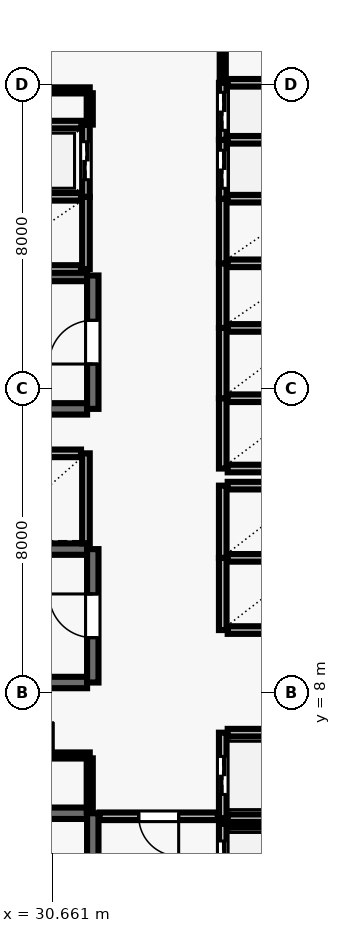
"""IFC4 building model, lengths in metres.
Left out: names, types, materials, properties, quantities, classifications, styles, units other than length and angle.
Written with IfcOpenShell. Run it as: python <this file> out.ifc"""

import sys

from ifc_helpers import new_model, si_unit, direction, frame, frame_2d, origin, place, context, subcontext, project, spatial, rectangle, extrude, element, fill, save


model = new_model("IFC4")
c1 = context("Model", 3, precision=1e-05, world=origin(), true_north=direction((0.0, 1.0)))
c2 = subcontext(c1, "Body", "Model", "MODEL_VIEW")
j1 = project(units=[si_unit("LENGTHUNIT", "METRE"), si_unit("PLANEANGLEUNIT", "RADIAN")], contexts=[c1])
p1 = place(None, origin())
s1 = spatial("IfcSite", under=j1, at=p1, CompositionType="ELEMENT")
p2 = place(p1, origin())
s2 = spatial("IfcBuilding", under=s1, at=p2, CompositionType="ELEMENT")
p3 = place(p2, frame((0.0, 0.0, 15.6)))
s3 = spatial("IfcBuildingStorey", under=s2, at=p3, CompositionType="ELEMENT", Elevation=15.6)
p4 = place(p3, frame((31.58, 4.83, 0.0), z_axis=(0.0, 0.0, 1.0), x_axis=(-1.0, 0.0, 0.0)))
e1 = element("IfcWall", 1, at=p4, inside=s3, PredefinedType="SHEAR", context=c2, shape_type="SweptSolid", body=[
    extrude(rectangle(XDim=8.36, YDim=0.3, at=frame_2d((4.18, 0.0))), origin(), (0.0, 0.0, 1.0), 4.92),
])
p5 = place(p3, frame((31.73, 0.96, 0.0), z_axis=(0.0, 0.0, 1.0), x_axis=(0.0, 1.0, 0.0)))
e2 = element("IfcWall", 2, at=p5, inside=s3, PredefinedType="SHEAR", context=c2, shape_type="SweptSolid", body=[
    extrude(rectangle(XDim=3.87, YDim=0.3, at=frame_2d((1.935, 0.0))), origin(), (0.0, 0.0, 1.0), 4.92),
])
p6 = place(p5, frame((1.54, 0.0, 0.0)))
e3 = element("IfcOpeningElement", 3, at=p6, cuts=e2, PredefinedType="OPENING", context=c2, shape_type="SweptSolid", body=[
    extrude(rectangle(XDim=1.15, YDim=2.15, at=frame_2d((0.575, 1.075))), frame((0.0, 0.16, 0.0), z_axis=(0.0, -1.0, 0.0), x_axis=(1.0, 0.0, 0.0)), (0.0, 0.0, 1.0), 0.32),
])
for number, where, z_axis, x_axis in (
    (4, (31.58, 18.98, 0.0), (0.0, 0.0, 1.0), (-1.0, 0.0, 0.0)),
    (5, (23.22, 15.47, 0.0), (0.0, 0.0, 1.0), (1.0, 0.0, 0.0)),
):
    element("IfcWall", number, at=place(p3, frame(where, z_axis=z_axis, x_axis=x_axis)), inside=s3, PredefinedType="SHEAR", context=c2, shape_type="SweptSolid", body=[
        extrude(rectangle(XDim=8.36, YDim=0.3, at=frame_2d((4.18, 0.0))), origin(), (0.0, 0.0, 1.0), 4.92),
    ])
p7 = place(p3, frame((31.73, 15.47, 0.0), z_axis=(0.0, 0.0, 1.0), x_axis=(0.0, 1.0, 0.0)))
e6 = element("IfcWall", 6, at=p7, inside=s3, PredefinedType="SHEAR", context=c2, shape_type="SweptSolid", body=[
    extrude(rectangle(XDim=3.51, YDim=0.3, at=frame_2d((1.755, 0.0))), origin(), (0.0, 0.0, 1.0), 4.92),
])
p8 = place(p7, frame((1.18, 0.0, 0.0)))
e7 = element("IfcOpeningElement", 7, at=p8, cuts=e6, PredefinedType="OPENING", context=c2, shape_type="SweptSolid", body=[
    extrude(rectangle(XDim=1.15, YDim=2.15, at=frame_2d((0.575, 1.075))), frame((0.0, 0.16, 0.0), z_axis=(0.0, -1.0, 0.0), x_axis=(1.0, 0.0, 0.0)), (0.0, 0.0, 1.0), 0.32),
])
for number, where, z_axis, x_axis in (
    (8, (31.58, 11.78, 0.0), (0.0, 0.0, 1.0), (-1.0, 0.0, 0.0)),
    (9, (23.22, 8.27, 0.0), (0.0, 0.0, 1.0), (1.0, 0.0, 0.0)),
):
    element("IfcWall", number, at=place(p3, frame(where, z_axis=z_axis, x_axis=x_axis)), inside=s3, PredefinedType="SHEAR", context=c2, shape_type="SweptSolid", body=[
        extrude(rectangle(XDim=8.36, YDim=0.3, at=frame_2d((4.18, 0.0))), origin(), (0.0, 0.0, 1.0), 4.92),
    ])
p9 = place(p3, frame((31.73, 8.27, 0.0), z_axis=(0.0, 0.0, 1.0), x_axis=(0.0, 1.0, 0.0)))
e10 = element("IfcWall", 10, at=p9, inside=s3, PredefinedType="SHEAR", context=c2, shape_type="SweptSolid", body=[
    extrude(rectangle(XDim=3.51, YDim=0.3, at=frame_2d((1.755, 0.0))), origin(), (0.0, 0.0, 1.0), 4.92),
])
p10 = place(p9, frame((1.18, 0.0, 0.0)))
e11 = element("IfcOpeningElement", 11, at=p10, cuts=e10, PredefinedType="OPENING", context=c2, shape_type="SweptSolid", body=[
    extrude(rectangle(XDim=1.15, YDim=2.15, at=frame_2d((0.575, 1.075))), frame((0.0, 0.16, 0.0), z_axis=(0.0, -1.0, 0.0), x_axis=(1.0, 0.0, 0.0)), (0.0, 0.0, 1.0), 0.32),
])
p11 = place(p3, frame((35.15, 4.55, 0.0), z_axis=(0.0, 0.0, 1.0), x_axis=(0.0, -1.0, 0.0)))
e12 = element("IfcWall", 12, at=p11, inside=s3, PredefinedType="SOLIDWALL", context=c2, shape_type="SweptSolid", body=[
    extrude(rectangle(XDim=2.1, YDim=0.2, at=frame_2d((1.05, 0.0))), origin(), (0.0, 0.0, 1.0), 4.92),
])
p12 = place(p11, frame((0.45, 0.0, 0.0)))
e13 = element("IfcOpeningElement", 13, at=p12, cuts=e12, PredefinedType="OPENING", context=c2, shape_type="SweptSolid", body=[
    extrude(rectangle(XDim=1.2, YDim=2.15, at=frame_2d((0.6, 1.075))), frame((0.0, 0.11, 0.0), z_axis=(0.0, -1.0, 0.0), x_axis=(1.0, 0.0, 0.0)), (0.0, 0.0, 1.0), 0.22),
])
p13 = place(p3, frame((37.42, 4.55, 0.0), z_axis=(0.0, 0.0, 1.0), x_axis=(-1.0, 0.0, 0.0)))
e14 = element("IfcWall", 14, at=p13, inside=s3, PredefinedType="SOLIDWALL", context=c2, shape_type="SweptSolid", body=[
    extrude(rectangle(XDim=2.14, YDim=0.2, at=frame_2d((1.07, 0.0))), origin(), (0.0, 0.0, 1.0), 4.92),
])
p14 = place(p3, frame((35.15, 6.95, 0.0), z_axis=(0.0, 0.0, 1.0), x_axis=(0.0, -1.0, 0.0)))
e15 = element("IfcWall", 15, at=p14, inside=s3, PredefinedType="SOLIDWALL", context=c2, shape_type="SweptSolid", body=[
    extrude(rectangle(XDim=2.25, YDim=0.2, at=frame_2d((1.125, 0.0))), origin(), (0.0, 0.0, 1.0), 4.92),
])
p15 = place(p14, frame((0.625, 0.0, 0.0)))
e16 = element("IfcOpeningElement", 16, at=p15, cuts=e15, PredefinedType="OPENING", context=c2, shape_type="SweptSolid", body=[
    extrude(rectangle(XDim=1.0, YDim=2.1, at=frame_2d((0.5, 1.05))), frame((0.0, 0.11, 0.0), z_axis=(0.0, -1.0, 0.0), x_axis=(1.0, 0.0, 0.0)), (0.0, 0.0, 1.0), 0.22),
])
for number, where, z_axis, x_axis in (
    (17, (35.28, 4.7, 0.0), (0.0, 0.0, 1.0), (1.0, 0.0, 0.0)),
    (18, (37.42, 6.95, 0.0), (0.0, 0.0, 1.0), (-1.0, 0.0, 0.0)),
):
    element("IfcWall", number, at=place(p3, frame(where, z_axis=z_axis, x_axis=x_axis)), inside=s3, PredefinedType="SOLIDWALL", context=c2, shape_type="SweptSolid", body=[
        extrude(rectangle(XDim=2.14, YDim=0.2, at=frame_2d((1.07, 0.0))), origin(), (0.0, 0.0, 1.0), 4.92),
    ])
p16 = place(p3, frame((35.15, 11.55, 0.0), z_axis=(0.0, 0.0, 1.0), x_axis=(0.0, -1.0, 0.0)))
e19 = element("IfcWall", 19, at=p16, inside=s3, PredefinedType="SOLIDWALL", context=c2, shape_type="SweptSolid", body=[
    extrude(rectangle(XDim=1.9, YDim=0.2, at=frame_2d((0.95, 0.0))), origin(), (0.0, 0.0, 1.0), 4.92),
])
for number, where, z_axis, x_axis in (
    (20, (35.28, 9.65, 0.0), (0.0, 0.0, 1.0), (1.0, 0.0, 0.0)),
    (21, (37.42, 11.55, 0.0), (0.0, 0.0, 1.0), (-1.0, 0.0, 0.0)),
):
    element("IfcWall", number, at=place(p3, frame(where, z_axis=z_axis, x_axis=x_axis)), inside=s3, PredefinedType="SOLIDWALL", context=c2, shape_type="SweptSolid", body=[
        extrude(rectangle(XDim=2.14, YDim=0.2, at=frame_2d((1.07, 0.0))), origin(), (0.0, 0.0, 1.0), 4.92),
    ])
p17 = place(p3, frame((35.15, 13.45, 0.0), z_axis=(0.0, 0.0, 1.0), x_axis=(0.0, -1.0, 0.0)))
e22 = element("IfcWall", 22, at=p17, inside=s3, PredefinedType="SOLIDWALL", context=c2, shape_type="SweptSolid", body=[
    extrude(rectangle(XDim=1.9, YDim=0.2, at=frame_2d((0.95, 0.0))), origin(), (0.0, 0.0, 1.0), 4.92),
])
p18 = place(p3, frame((37.42, 13.45, 0.0), z_axis=(0.0, 0.0, 1.0), x_axis=(-1.0, 0.0, 0.0)))
e23 = element("IfcWall", 23, at=p18, inside=s3, PredefinedType="SOLIDWALL", context=c2, shape_type="SweptSolid", body=[
    extrude(rectangle(XDim=2.14, YDim=0.2, at=frame_2d((1.07, 0.0))), origin(), (0.0, 0.0, 1.0), 4.92),
])
p19 = place(p3, frame((31.55, 11.93, 0.0), z_axis=(0.0, 0.0, 1.0), x_axis=(0.0, 1.0, 0.0)))
e24 = element("IfcWall", 24, at=p19, inside=s3, PredefinedType="SOLIDWALL", context=c2, shape_type="SweptSolid", body=[
    extrude(rectangle(XDim=2.37, YDim=0.2, at=frame_2d((1.185, 0.0))), origin(), (0.0, 0.0, 1.0), 4.92),
])
p20 = place(p3, frame((31.42, 14.3, 0.0), z_axis=(0.0, 0.0, 1.0), x_axis=(-1.0, 0.0, 0.0)))
e25 = element("IfcWall", 25, at=p20, inside=s3, PredefinedType="SOLIDWALL", context=c2, shape_type="SweptSolid", body=[
    extrude(rectangle(XDim=2.44, YDim=0.2, at=frame_2d((1.22, 0.0))), origin(), (0.0, 0.0, 1.0), 4.92),
])
p21 = place(p3, frame((35.15, 15.75, 0.0), z_axis=(0.0, 0.0, 1.0), x_axis=(0.0, -1.0, 0.0)))
e26 = element("IfcWall", 26, at=p21, inside=s3, PredefinedType="SOLIDWALL", context=c2, shape_type="SweptSolid", body=[
    extrude(rectangle(XDim=1.85, YDim=0.2, at=frame_2d((0.925, 0.0))), origin(), (0.0, 0.0, 1.0), 4.92),
])
for number, where, z_axis, x_axis in (
    (27, (35.28, 13.9, 0.0), (0.0, 0.0, 1.0), (1.0, 0.0, 0.0)),
    (28, (37.42, 15.75, 0.0), (0.0, 0.0, 1.0), (-1.0, 0.0, 0.0)),
):
    element("IfcWall", number, at=place(p3, frame(where, z_axis=z_axis, x_axis=x_axis)), inside=s3, PredefinedType="SOLIDWALL", context=c2, shape_type="SweptSolid", body=[
        extrude(rectangle(XDim=2.14, YDim=0.2, at=frame_2d((1.07, 0.0))), origin(), (0.0, 0.0, 1.0), 4.92),
    ])
p22 = place(p3, frame((35.15, 17.6, 0.0), z_axis=(0.0, 0.0, 1.0), x_axis=(0.0, -1.0, 0.0)))
e29 = element("IfcWall", 29, at=p22, inside=s3, PredefinedType="SOLIDWALL", context=c2, shape_type="SweptSolid", body=[
    extrude(rectangle(XDim=1.85, YDim=0.2, at=frame_2d((0.925, 0.0))), origin(), (0.0, 0.0, 1.0), 4.92),
])
p23 = place(p3, frame((37.42, 17.6, 0.0), z_axis=(0.0, 0.0, 1.0), x_axis=(-1.0, 0.0, 0.0)))
e30 = element("IfcWall", 30, at=p23, inside=s3, PredefinedType="SOLIDWALL", context=c2, shape_type="SweptSolid", body=[
    extrude(rectangle(XDim=2.14, YDim=0.2, at=frame_2d((1.07, 0.0))), origin(), (0.0, 0.0, 1.0), 4.92),
])
p24 = place(p3, frame((35.15, 19.3, 0.0), z_axis=(0.0, 0.0, 1.0), x_axis=(0.0, -1.0, 0.0)))
e31 = element("IfcWall", 31, at=p24, inside=s3, PredefinedType="SOLIDWALL", context=c2, shape_type="SweptSolid", body=[
    extrude(rectangle(XDim=1.7, YDim=0.2, at=frame_2d((0.85, 0.0))), origin(), (0.0, 0.0, 1.0), 4.92),
])
p25 = place(p3, frame((37.42, 19.3, 0.0), z_axis=(0.0, 0.0, 1.0), x_axis=(-1.0, 0.0, 0.0)))
e32 = element("IfcWall", 32, at=p25, inside=s3, PredefinedType="SOLIDWALL", context=c2, shape_type="SweptSolid", body=[
    extrude(rectangle(XDim=2.14, YDim=0.2, at=frame_2d((1.07, 0.0))), origin(), (0.0, 0.0, 1.0), 4.92),
])
p26 = place(p3, frame((35.15, 21.0, 0.0), z_axis=(0.0, 0.0, 1.0), x_axis=(0.0, -1.0, 0.0)))
e33 = element("IfcWall", 33, at=p26, inside=s3, PredefinedType="SOLIDWALL", context=c2, shape_type="SweptSolid", body=[
    extrude(rectangle(XDim=1.7, YDim=0.2, at=frame_2d((0.85, 0.0))), origin(), (0.0, 0.0, 1.0), 4.92),
])
p27 = place(p3, frame((37.42, 21.0, 0.0), z_axis=(0.0, 0.0, 1.0), x_axis=(-1.0, 0.0, 0.0)))
e34 = element("IfcWall", 34, at=p27, inside=s3, PredefinedType="SOLIDWALL", context=c2, shape_type="SweptSolid", body=[
    extrude(rectangle(XDim=2.14, YDim=0.2, at=frame_2d((1.07, 0.0))), origin(), (0.0, 0.0, 1.0), 4.92),
])
p28 = place(p3, frame((31.55, 19.15, 0.0), z_axis=(0.0, 0.0, 1.0), x_axis=(0.0, 1.0, 0.0)))
e35 = element("IfcWall", 35, at=p28, inside=s3, PredefinedType="SOLIDWALL", context=c2, shape_type="SweptSolid", body=[
    extrude(rectangle(XDim=1.9, YDim=0.2, at=frame_2d((0.95, 0.0))), origin(), (0.0, 0.0, 1.0), 4.92),
])
for number, where, z_axis, x_axis in (
    (36, (28.98, 19.15, 0.0), (0.0, 0.0, 1.0), (1.0, 0.0, 0.0)),
    (37, (31.42, 21.05, 0.0), (0.0, 0.0, 1.0), (-1.0, 0.0, 0.0)),
):
    element("IfcWall", number, at=place(p3, frame(where, z_axis=z_axis, x_axis=x_axis)), inside=s3, PredefinedType="SOLIDWALL", context=c2, shape_type="SweptSolid", body=[
        extrude(rectangle(XDim=2.44, YDim=0.2, at=frame_2d((1.22, 0.0))), origin(), (0.0, 0.0, 1.0), 4.92),
    ])
p29 = place(p3, frame((35.15, 22.55, 0.0), z_axis=(0.0, 0.0, 1.0), x_axis=(0.0, -1.0, 0.0)))
e38 = element("IfcWall", 38, at=p29, inside=s3, PredefinedType="SOLIDWALL", context=c2, shape_type="SweptSolid", body=[
    extrude(rectangle(XDim=1.55, YDim=0.2, at=frame_2d((0.775, 0.0))), origin(), (0.0, 0.0, 1.0), 4.92),
])
p30 = place(p29, frame((0.275, 0.0, 0.0)))
e39 = element("IfcOpeningElement", 39, at=p30, cuts=e38, PredefinedType="OPENING", context=c2, shape_type="SweptSolid", body=[
    extrude(rectangle(XDim=1.0, YDim=2.1, at=frame_2d((0.5, 1.05))), frame((0.0, 0.11, 0.0), z_axis=(0.0, -1.0, 0.0), x_axis=(1.0, 0.0, 0.0)), (0.0, 0.0, 1.0), 0.22),
])
p31 = place(p3, frame((37.42, 22.55, 0.0), z_axis=(0.0, 0.0, 1.0), x_axis=(-1.0, 0.0, 0.0)))
e40 = element("IfcWall", 40, at=p31, inside=s3, PredefinedType="SOLIDWALL", context=c2, shape_type="SweptSolid", body=[
    extrude(rectangle(XDim=2.14, YDim=0.2, at=frame_2d((1.07, 0.0))), origin(), (0.0, 0.0, 1.0), 4.92),
])
p32 = place(p3, frame((35.15, 24.05, 0.0), z_axis=(0.0, 0.0, 1.0), x_axis=(0.0, -1.0, 0.0)))
e41 = element("IfcWall", 41, at=p32, inside=s3, PredefinedType="SOLIDWALL", context=c2, shape_type="SweptSolid", body=[
    extrude(rectangle(XDim=1.5, YDim=0.2, at=frame_2d((0.75, 0.0))), origin(), (0.0, 0.0, 1.0), 4.92),
])
p33 = place(p32, frame((0.25, 0.0, 0.0)))
e42 = element("IfcOpeningElement", 42, at=p33, cuts=e41, PredefinedType="OPENING", context=c2, shape_type="SweptSolid", body=[
    extrude(rectangle(XDim=1.0, YDim=2.1, at=frame_2d((0.5, 1.05))), frame((0.0, 0.11, 0.0), z_axis=(0.0, -1.0, 0.0), x_axis=(1.0, 0.0, 0.0)), (0.0, 0.0, 1.0), 0.22),
])
p34 = place(p3, frame((37.42, 24.05, 0.0), z_axis=(0.0, 0.0, 1.0), x_axis=(-1.0, 0.0, 0.0)))
e43 = element("IfcWall", 43, at=p34, inside=s3, PredefinedType="SOLIDWALL", context=c2, shape_type="SweptSolid", body=[
    extrude(rectangle(XDim=2.14, YDim=0.2, at=frame_2d((1.07, 0.0))), origin(), (0.0, 0.0, 1.0), 4.92),
])
p35 = place(p3, frame((31.55, 21.05, 0.0), z_axis=(0.0, 0.0, 1.0), x_axis=(0.0, 1.0, 0.0)))
e44 = element("IfcWall", 44, at=p35, inside=s3, PredefinedType="SOLIDWALL", context=c2, shape_type="SweptSolid", body=[
    extrude(rectangle(XDim=1.9, YDim=0.2, at=frame_2d((0.95, 0.0))), origin(), (0.0, 0.0, 1.0), 4.92),
])
p36 = place(p35, frame((0.45, 0.0, 0.0)))
e45 = element("IfcOpeningElement", 45, at=p36, cuts=e44, PredefinedType="OPENING", context=c2, shape_type="SweptSolid", body=[
    extrude(rectangle(XDim=1.0, YDim=2.1, at=frame_2d((0.5, 1.05))), frame((0.0, 0.11, 0.0), z_axis=(0.0, -1.0, 0.0), x_axis=(1.0, 0.0, 0.0)), (0.0, 0.0, 1.0), 0.22),
])
p37 = place(p3, frame((31.43, 22.95, 0.0), z_axis=(0.0, 0.0, 1.0), x_axis=(-1.0, 0.0, 0.0)))
e46 = element("IfcWall", 46, at=p37, inside=s3, PredefinedType="SOLIDWALL", context=c2, shape_type="SweptSolid", body=[
    extrude(rectangle(XDim=2.46, YDim=0.2, at=frame_2d((1.23, 0.0))), origin(), (0.0, 0.0, 1.0), 4.92),
])
p38 = place(p3, frame((28.8, 23.85, 0.0), z_axis=(0.0, 0.0, 1.0), x_axis=(1.0, 0.0, 0.0)))
e47 = element("IfcWall", 47, at=p38, inside=s3, PredefinedType="PARTITIONING", context=c2, shape_type="SweptSolid", body=[
    extrude(rectangle(XDim=2.85, YDim=0.16, at=frame_2d((1.425, 0.0))), origin(), (0.0, 0.0, 1.0), 4.92),
])
p39 = place(p3, frame((28.85, 6.35, 0.0), z_axis=(0.0, 0.0, 1.0), x_axis=(1.0, 0.0, 0.0)))
e48 = element("IfcWall", 48, at=p39, inside=s3, PredefinedType="PARTITIONING", context=c2, shape_type="SweptSolid", body=[
    extrude(rectangle(XDim=2.8, YDim=0.16, at=frame_2d((1.4, 0.0))), origin(), (0.0, 0.0, 1.0), 4.92),
])
p40 = place(p39, frame((0.96, 0.0, 0.0)))
e49 = element("IfcOpeningElement", 49, at=p40, cuts=e48, PredefinedType="OPENING", context=c2, shape_type="SweptSolid", body=[
    extrude(rectangle(XDim=0.88, YDim=2.1, at=frame_2d((0.44, 1.05))), frame((0.0, 0.09, 0.0), z_axis=(0.0, -1.0, 0.0), x_axis=(1.0, 0.0, 0.0)), (0.0, 0.0, 1.0), 0.18),
])
p41 = place(p3, frame((35.02, 4.75, 0.0), z_axis=(0.0, 0.0, 1.0), x_axis=(-1.0, 0.0, 0.0)))
e50 = element("IfcWall", 50, at=p41, inside=s3, PredefinedType="SOLIDWALL", context=c2, shape_type="SweptSolid", body=[
    extrude(rectangle(XDim=3.11, YDim=0.2, at=frame_2d((1.555, 0.0))), origin(), (0.0, 0.0, 1.0), 4.92),
])
p42 = place(p41, frame((1.03, 0.0, 0.0)))
e51 = element("IfcOpeningElement", 51, at=p42, cuts=e50, PredefinedType="OPENING", context=c2, shape_type="SweptSolid", body=[
    extrude(rectangle(XDim=1.05, YDim=2.15, at=frame_2d((0.525, 1.075))), frame((0.0, 0.11, 0.0), z_axis=(0.0, -1.0, 0.0), x_axis=(1.0, 0.0, 0.0)), (0.0, 0.0, 1.0), 0.22),
])
p43 = place(p3, frame((31.65, 4.86, 0.0), z_axis=(0.0, 0.0, 1.0), x_axis=(0.0, 1.0, 0.0)))
e52 = element("IfcWall", 52, at=p43, inside=s3, PredefinedType="PARTITIONING", context=c2, shape_type="SweptSolid", body=[
    extrude(rectangle(XDim=1.415, YDim=0.16, at=frame_2d((0.708, 0.0))), origin(), (0.0, 0.0, 1.0), 4.92),
])
p44 = place(p3, frame((31.65, 23.775, 0.0), z_axis=(0.0, 0.0, 1.0), x_axis=(0.0, -1.0, 0.0)))
e53 = element("IfcWall", 53, at=p44, inside=s3, PredefinedType="PARTITIONING", context=c2, shape_type="SweptSolid", body=[
    extrude(rectangle(XDim=0.825, YDim=0.16, at=frame_2d((0.413, 0.0))), origin(), (0.0, 0.0, 1.0), 4.92),
])
p45 = place(p3, frame((35.15, 24.07, 0.0), z_axis=(0.0, 0.0, 1.0), x_axis=(0.0, 1.0, 0.0)))
e54 = element("IfcWall", 54, at=p45, inside=s3, PredefinedType="PARTITIONING", context=c2, shape_type="SweptSolid", body=[
    extrude(rectangle(XDim=1.855, YDim=0.16, at=frame_2d((0.927, 0.0))), origin(), (0.0, 0.0, 1.0), 4.92),
])
p46 = place(p8, origin())
e55 = element("IfcDoor", 55, at=p46, inside=s3, OperationType="SINGLE_SWING_LEFT", PredefinedType="DOOR", context=c2, shape_type="SweptSolid", body=[
    extrude(rectangle(XDim=1.15, YDim=2.15, at=frame_2d((0.575, 1.075))), frame((0.0, 0.025, 0.0), z_axis=(0.0, -1.0, 0.0), x_axis=(1.0, 0.0, 0.0)), (0.0, 0.0, 1.0), 0.05),
])
fill(e7, e55)
p47 = place(p10, origin())
e56 = element("IfcDoor", 56, at=p47, inside=s3, OperationType="SINGLE_SWING_RIGHT", PredefinedType="DOOR", context=c2, shape_type="SweptSolid", body=[
    extrude(rectangle(XDim=1.15, YDim=2.15, at=frame_2d((0.575, 1.075))), frame((0.0, 0.025, 0.0), z_axis=(0.0, -1.0, 0.0), x_axis=(1.0, 0.0, 0.0)), (0.0, 0.0, 1.0), 0.05),
])
fill(e11, e56)
p48 = place(p12, origin())
e57 = element("IfcDoor", 57, at=p48, inside=s3, OperationType="DOUBLE_DOOR_SLIDING", PredefinedType="DOOR", context=c2, shape_type="SweptSolid", body=[
    extrude(rectangle(XDim=1.2, YDim=2.15, at=frame_2d((0.6, 1.075))), frame((0.0, 0.025, 0.0), z_axis=(0.0, -1.0, 0.0), x_axis=(1.0, 0.0, 0.0)), (0.0, 0.0, 1.0), 0.05),
])
fill(e13, e57)
p49 = place(p15, origin())
e58 = element("IfcDoor", 58, at=p49, inside=s3, OperationType="DOUBLE_DOOR_SLIDING", PredefinedType="DOOR", context=c2, shape_type="SweptSolid", body=[
    extrude(rectangle(XDim=1.0, YDim=2.1, at=frame_2d((0.5, 1.05))), frame((0.0, 0.025, 0.0), z_axis=(0.0, -1.0, 0.0), x_axis=(1.0, 0.0, 0.0)), (0.0, 0.0, 1.0), 0.05),
])
fill(e16, e58)
p50 = place(p30, origin())
e59 = element("IfcDoor", 59, at=p50, inside=s3, OperationType="DOUBLE_DOOR_SLIDING", PredefinedType="DOOR", context=c2, shape_type="SweptSolid", body=[
    extrude(rectangle(XDim=1.0, YDim=2.1, at=frame_2d((0.5, 1.05))), frame((0.0, 0.025, 0.0), z_axis=(0.0, -1.0, 0.0), x_axis=(1.0, 0.0, 0.0)), (0.0, 0.0, 1.0), 0.05),
])
fill(e39, e59)
p51 = place(p33, origin())
e60 = element("IfcDoor", 60, at=p51, inside=s3, OperationType="DOUBLE_DOOR_SLIDING", PredefinedType="DOOR", context=c2, shape_type="SweptSolid", body=[
    extrude(rectangle(XDim=1.0, YDim=2.1, at=frame_2d((0.5, 1.05))), frame((0.0, 0.025, 0.0), z_axis=(0.0, -1.0, 0.0), x_axis=(1.0, 0.0, 0.0)), (0.0, 0.0, 1.0), 0.05),
])
fill(e42, e60)
p52 = place(p36, origin())
e61 = element("IfcDoor", 61, at=p52, inside=s3, OperationType="DOUBLE_DOOR_SLIDING", PredefinedType="DOOR", context=c2, shape_type="SweptSolid", body=[
    extrude(rectangle(XDim=1.0, YDim=2.1, at=frame_2d((0.5, 1.05))), frame((0.0, 0.025, 0.0), z_axis=(0.0, -1.0, 0.0), x_axis=(1.0, 0.0, 0.0)), (0.0, 0.0, 1.0), 0.05),
])
fill(e45, e61)
p53 = place(p42, origin())
e62 = element("IfcDoor", 62, at=p53, inside=s3, OperationType="SINGLE_SWING_LEFT", PredefinedType="DOOR", context=c2, shape_type="SweptSolid", body=[
    extrude(rectangle(XDim=1.05, YDim=2.15, at=frame_2d((0.525, 1.075))), frame((0.0, 0.025, 0.0), z_axis=(0.0, -1.0, 0.0), x_axis=(1.0, 0.0, 0.0)), (0.0, 0.0, 1.0), 0.05),
])
fill(e51, e62)
p54 = place(p40, origin())
e63 = element("IfcDoor", 63, at=p54, inside=s3, OperationType="SINGLE_SWING_RIGHT", PredefinedType="DOOR", context=c2, shape_type="SweptSolid", body=[
    extrude(rectangle(XDim=0.88, YDim=2.1, at=frame_2d((0.44, 1.05))), frame((0.0, 0.025, 0.0), z_axis=(0.0, -1.0, 0.0), x_axis=(1.0, 0.0, 0.0)), (0.0, 0.0, 1.0), 0.05),
])
fill(e49, e63)
save(model, sys.argv[1])
